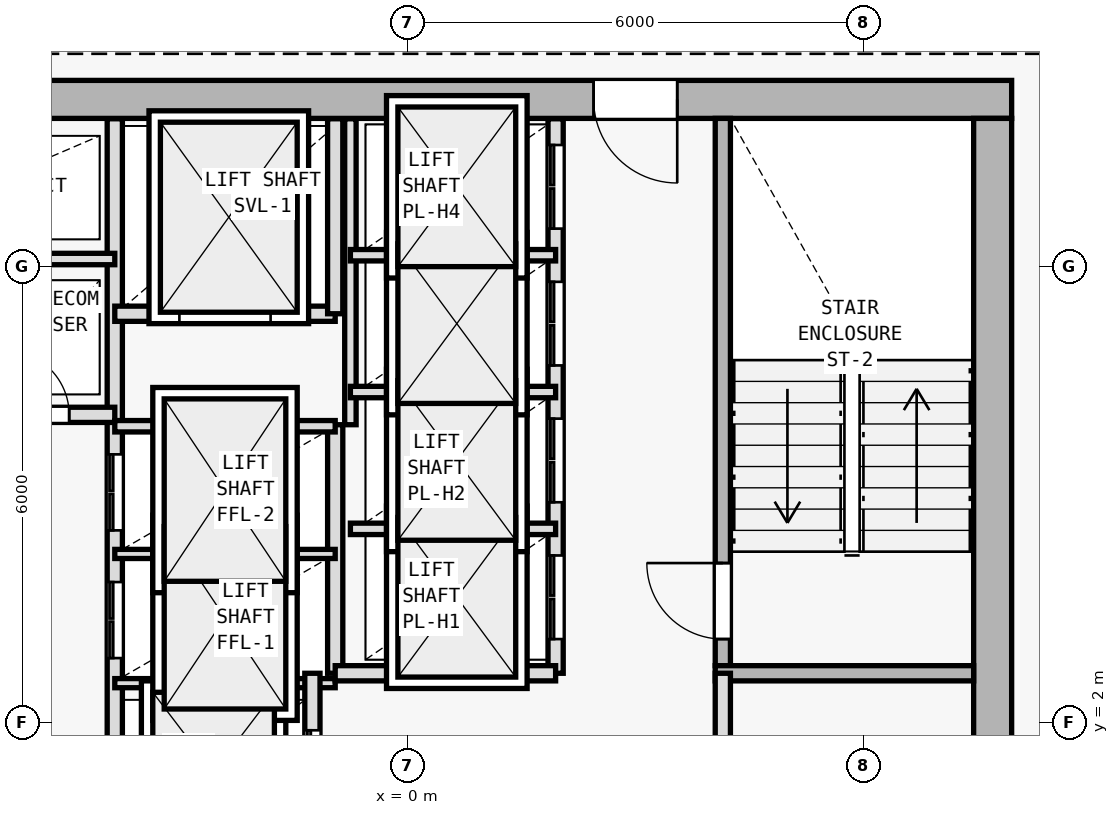
"""IFC4 building model, lengths in metres.
Left out: names, types, materials, properties, quantities, classifications, styles, units other than length and angle.
Written with IfcOpenShell. Run it as: python <this file> out.ifc"""

import sys

from ifc_helpers import new_model, si_unit, direction, frame, frame_2d, origin, origin_2d, place, context, subcontext, project, spatial, rectangle, i_section, extrude, element, fill, save


model = new_model("IFC4")
c1 = context("Model", 3, precision=1e-05, world=origin(), true_north=direction((0.0, 1.0)))
c2 = subcontext(c1, "Body", "Model", "MODEL_VIEW")
j1 = project(units=[si_unit("LENGTHUNIT", "METRE"), si_unit("PLANEANGLEUNIT", "RADIAN")], contexts=[c1])
p1 = place(None, origin())
s1 = spatial("IfcSite", under=j1, at=p1, CompositionType="ELEMENT")
p2 = place(p1, origin())
s2 = spatial("IfcBuilding", under=s1, at=p2, CompositionType="ELEMENT")
p3 = place(p2, frame((0.0, 0.0, 198.3)))
s3 = spatial("IfcBuildingStorey", under=s2, at=p3, CompositionType="ELEMENT", Elevation=198.3)
p4 = place(p3, frame((7.7, 10.2, 0.0), z_axis=(0.0, 0.0, 1.0), x_axis=(1.0, 0.0, 0.0)))
e1 = element("IfcColumn", 1, at=p4, inside=s3, PredefinedType="COLUMN", context=c2, shape_type="SweptSolid", body=[
    extrude(i_section(OverallWidth=0.398, OverallDepth=0.387, WebThickness=0.013, FlangeThickness=0.022, FilletRadius=0.015, at=origin_2d()), origin(), (0.0, 0.0, 1.0), 3.6),
])
p5 = place(p3, frame((7.95, 10.2, 0.0), z_axis=(0.0, 0.0, 1.0), x_axis=(-1.0, 0.0, 0.0)))
e2 = element("IfcWall", 2, at=p5, inside=s3, PredefinedType="SHEAR", context=c2, shape_type="SweptSolid", body=[
    extrude(rectangle(XDim=15.9, YDim=0.5, at=frame_2d((7.95, 0.0))), origin(), (0.0, 0.0, 1.0), 3.35),
])
p6 = place(p5, frame((4.4, 0.0, 0.0)))
e3 = element("IfcOpeningElement", 3, at=p6, cuts=e2, PredefinedType="OPENING", context=c2, shape_type="SweptSolid", body=[
    extrude(rectangle(XDim=1.1, YDim=2.15, at=frame_2d((0.55, 1.075))), frame((0.0, 0.26, 0.0), z_axis=(0.0, -1.0, 0.0), x_axis=(1.0, 0.0, 0.0)), (0.0, 0.0, 1.0), 0.52),
])
p7 = place(p3, frame((7.7, 9.95, 0.0), z_axis=(0.0, 0.0, 1.0), x_axis=(0.0, -1.0, 0.0)))
e4 = element("IfcWall", 4, at=p7, inside=s3, PredefinedType="SHEAR", context=c2, shape_type="SweptSolid", body=[
    extrude(rectangle(XDim=19.1, YDim=0.5, at=frame_2d((9.55, 0.0))), origin(), (0.0, 0.0, 1.0), 3.35),
])
p8 = place(p3, frame((-3.85, 1.35, 0.0), z_axis=(0.0, 0.0, 1.0), x_axis=(0.0, 1.0, 0.0)))
e5 = element("IfcWall", 5, at=p8, inside=s3, PredefinedType="SOLIDWALL", context=c2, shape_type="SweptSolid", body=[
    extrude(rectangle(XDim=8.595, YDim=0.2, at=frame_2d((4.297, 0.0))), origin(), (0.0, 0.0, 1.0), 3.35),
])
p9 = place(p8, frame((1.5, 0.0, 0.0)))
e6 = element("IfcOpeningElement", 6, at=p9, cuts=e5, PredefinedType="OPENING", context=c2, shape_type="SweptSolid", body=[
    extrude(rectangle(XDim=1.0, YDim=2.15, at=frame_2d((0.5, 1.075))), frame((0.0, 0.11, 0.0), z_axis=(0.0, -1.0, 0.0), x_axis=(1.0, 0.0, 0.0)), (0.0, 0.0, 1.0), 0.22),
])
p10 = place(p8, frame((3.18, 0.0, 0.0)))
e7 = element("IfcOpeningElement", 7, at=p10, cuts=e5, PredefinedType="OPENING", context=c2, shape_type="SweptSolid", body=[
    extrude(rectangle(XDim=1.0, YDim=2.15, at=frame_2d((0.5, 1.075))), frame((0.0, 0.11, 0.0), z_axis=(0.0, -1.0, 0.0), x_axis=(1.0, 0.0, 0.0)), (0.0, 0.0, 1.0), 0.22),
])
p11 = place(p3, frame((-7.445, 6.05, 0.0), z_axis=(0.0, 0.0, 1.0), x_axis=(1.0, 0.0, 0.0)))
e8 = element("IfcWall", 8, at=p11, inside=s3, PredefinedType="SOLIDWALL", context=c2, shape_type="SweptSolid", body=[
    extrude(rectangle(XDim=3.595, YDim=0.2, at=frame_2d((1.797, 0.0))), origin(), (0.0, 0.0, 1.0), 3.35),
])
p12 = place(p11, frame((0.345, 0.0, 0.0)))
e9 = element("IfcOpeningElement", 9, at=p12, cuts=e8, PredefinedType="OPENING", context=c2, shape_type="SweptSolid", body=[
    extrude(rectangle(XDim=0.85, YDim=2.1, at=frame_2d((0.425, 1.05))), frame((0.0, 0.11, 0.0), z_axis=(0.0, -1.0, 0.0), x_axis=(1.0, 0.0, 0.0)), (0.0, 0.0, 1.0), 0.22),
])
p13 = place(p11, frame((2.145, 0.0, 0.0)))
e10 = element("IfcOpeningElement", 10, at=p13, cuts=e8, PredefinedType="OPENING", context=c2, shape_type="SweptSolid", body=[
    extrude(rectangle(XDim=0.85, YDim=2.1, at=frame_2d((0.425, 1.05))), frame((0.0, 0.11, 0.0), z_axis=(0.0, -1.0, 0.0), x_axis=(1.0, 0.0, 0.0)), (0.0, 0.0, 1.0), 0.22),
])
p14 = place(p3, frame((-7.445, 8.1, 0.0), z_axis=(0.0, 0.0, 1.0), x_axis=(1.0, 0.0, 0.0)))
e11 = element("IfcWall", 11, at=p14, inside=s3, PredefinedType="PARTITIONING", context=c2, shape_type="SweptSolid", body=[
    extrude(rectangle(XDim=3.595, YDim=0.15, at=frame_2d((1.797, 0.0))), origin(), (0.0, 0.0, 1.0), 3.35),
])
p15 = place(p3, frame((4.15, 2.75, 0.0), z_axis=(0.0, 0.0, 1.0), x_axis=(0.0, 1.0, 0.0)))
e12 = element("IfcWall", 12, at=p15, inside=s3, PredefinedType="SOLIDWALL", context=c2, shape_type="SweptSolid", body=[
    extrude(rectangle(XDim=7.2, YDim=0.2, at=frame_2d((3.6, 0.0))), origin(), (0.0, 0.0, 1.0), 3.35),
])
p16 = place(p15, frame((0.35, 0.0, 0.0)))
e13 = element("IfcOpeningElement", 13, at=p16, cuts=e12, PredefinedType="OPENING", context=c2, shape_type="SweptSolid", body=[
    extrude(rectangle(XDim=1.0, YDim=2.15, at=frame_2d((0.5, 1.075))), frame((0.0, 0.11, 0.0), z_axis=(0.0, -1.0, 0.0), x_axis=(1.0, 0.0, 0.0)), (0.0, 0.0, 1.0), 0.22),
])
p17 = place(p3, frame((4.05, 2.65, 0.0), z_axis=(0.0, 0.0, 1.0), x_axis=(1.0, 0.0, 0.0)))
e14 = element("IfcWall", 14, at=p17, inside=s3, PredefinedType="SOLIDWALL", context=c2, shape_type="SweptSolid", body=[
    extrude(rectangle(XDim=3.4, YDim=0.2, at=frame_2d((1.7, 0.0))), origin(), (0.0, 0.0, 1.0), 3.35),
])
p18 = place(p3, frame((-0.95, 2.65, 0.0), z_axis=(0.0, 0.0, 1.0), x_axis=(0.0, 1.0, 0.0)))
e15 = element("IfcWall", 15, at=p18, inside=s3, PredefinedType="SOLIDWALL", context=c2, shape_type="SweptSolid", body=[
    extrude(rectangle(XDim=3.27, YDim=0.2, at=frame_2d((1.635, 0.0))), origin(), (0.0, 0.0, 1.0), 3.35),
])
for number, where, z_axis, x_axis in (
    (16, (-3.85, 2.52, 0.0), (0.0, 0.0, 1.0), (1.0, 0.0, 0.0)),
    (17, (-3.85, 4.22, 0.0), (0.0, 0.0, 1.0), (1.0, 0.0, 0.0)),
):
    element("IfcWall", number, at=place(p3, frame(where, z_axis=z_axis, x_axis=x_axis)), inside=s3, PredefinedType="PARTITIONING", context=c2, shape_type="SweptSolid", body=[
        extrude(rectangle(XDim=2.9, YDim=0.12, at=frame_2d((1.45, 0.0))), origin(), (0.0, 0.0, 1.0), 3.35),
    ])
p19 = place(p3, frame((-3.85, 5.9, 0.0), z_axis=(0.0, 0.0, 1.0), x_axis=(1.0, 0.0, 0.0)))
e18 = element("IfcWall", 18, at=p19, inside=s3, PredefinedType="PARTITIONING", context=c2, shape_type="SweptSolid", body=[
    extrude(rectangle(XDim=2.9, YDim=0.15, at=frame_2d((1.45, 0.0))), origin(), (0.0, 0.0, 1.0), 3.35),
])
p20 = place(p3, frame((-3.85, 7.38, 0.0), z_axis=(0.0, 0.0, 1.0), x_axis=(1.0, 0.0, 0.0)))
e19 = element("IfcWall", 19, at=p20, inside=s3, PredefinedType="SOLIDWALL", context=c2, shape_type="SweptSolid", body=[
    extrude(rectangle(XDim=2.9, YDim=0.2, at=frame_2d((1.45, 0.0))), origin(), (0.0, 0.0, 1.0), 3.35),
])
p21 = place(p20, frame((0.85, 0.0, 0.0)))
e20 = element("IfcOpeningElement", 20, at=p21, cuts=e19, PredefinedType="OPENING", context=c2, shape_type="SweptSolid", body=[
    extrude(rectangle(XDim=1.2, YDim=2.2, at=frame_2d((0.6, 1.1))), frame((0.0, 0.11, 0.0), z_axis=(0.0, -1.0, 0.0), x_axis=(1.0, 0.0, 0.0)), (0.0, 0.0, 1.0), 0.22),
])
p22 = place(p3, frame((-0.95, 7.38, 0.0), z_axis=(0.0, 0.0, 1.0), x_axis=(0.0, 1.0, 0.0)))
e21 = element("IfcWall", 21, at=p22, inside=s3, PredefinedType="SOLIDWALL", context=c2, shape_type="SweptSolid", body=[
    extrude(rectangle(XDim=2.565, YDim=0.2, at=frame_2d((1.283, 0.0))), origin(), (0.0, 0.0, 1.0), 3.35),
])
p23 = place(p3, frame((4.15, -6.05, 0.0), z_axis=(0.0, 0.0, 1.0), x_axis=(0.0, 1.0, 0.0)))
e22 = element("IfcWall", 22, at=p23, inside=s3, PredefinedType="SOLIDWALL", context=c2, shape_type="SweptSolid", body=[
    extrude(rectangle(XDim=8.7, YDim=0.2, at=frame_2d((4.35, 0.0))), origin(), (0.0, 0.0, 1.0), 3.35),
])
p24 = place(p23, frame((3.6, 0.0, 0.0)))
e23 = element("IfcOpeningElement", 23, at=p24, cuts=e22, PredefinedType="OPENING", context=c2, shape_type="SweptSolid", body=[
    extrude(rectangle(XDim=0.95, YDim=2.1, at=frame_2d((0.475, 1.05))), frame((0.0, 0.11, 0.0), z_axis=(0.0, -1.0, 0.0), x_axis=(1.0, 0.0, 0.0)), (0.0, 0.0, 1.0), 0.22),
])
p25 = place(p3, frame((-1.25, -6.05, 0.0), z_axis=(0.0, 0.0, 1.0), x_axis=(0.0, 1.0, 0.0)))
e24 = element("IfcWall", 24, at=p25, inside=s3, PredefinedType="SOLIDWALL", context=c2, shape_type="SweptSolid", body=[
    extrude(rectangle(XDim=8.7, YDim=0.2, at=frame_2d((4.35, 0.0))), origin(), (0.0, 0.0, 1.0), 3.35),
])
p26 = place(p25, frame((0.55, 0.0, 0.0)))
e25 = element("IfcOpeningElement", 25, at=p26, cuts=e24, PredefinedType="OPENING", context=c2, shape_type="SweptSolid", body=[
    extrude(rectangle(XDim=1.1, YDim=2.15, at=frame_2d((0.55, 1.075))), frame((0.0, 0.11, 0.0), z_axis=(0.0, -1.0, 0.0), x_axis=(1.0, 0.0, 0.0)), (0.0, 0.0, 1.0), 0.22),
])
p27 = place(p25, frame((2.65, 0.0, 0.0)))
e26 = element("IfcOpeningElement", 26, at=p27, cuts=e24, PredefinedType="OPENING", context=c2, shape_type="SweptSolid", body=[
    extrude(rectangle(XDim=1.1, YDim=2.15, at=frame_2d((0.55, 1.075))), frame((0.0, 0.11, 0.0), z_axis=(0.0, -1.0, 0.0), x_axis=(1.0, 0.0, 0.0)), (0.0, 0.0, 1.0), 0.22),
])
p28 = place(p25, frame((4.75, 0.0, 0.0)))
e27 = element("IfcOpeningElement", 27, at=p28, cuts=e24, PredefinedType="OPENING", context=c2, shape_type="SweptSolid", body=[
    extrude(rectangle(XDim=1.1, YDim=2.15, at=frame_2d((0.55, 1.075))), frame((0.0, 0.11, 0.0), z_axis=(0.0, -1.0, 0.0), x_axis=(1.0, 0.0, 0.0)), (0.0, 0.0, 1.0), 0.22),
])
p29 = place(p25, frame((6.85, 0.0, 0.0)))
e28 = element("IfcOpeningElement", 28, at=p29, cuts=e24, PredefinedType="OPENING", context=c2, shape_type="SweptSolid", body=[
    extrude(rectangle(XDim=1.1, YDim=2.15, at=frame_2d((0.55, 1.075))), frame((0.0, 0.11, 0.0), z_axis=(0.0, -1.0, 0.0), x_axis=(1.0, 0.0, 0.0)), (0.0, 0.0, 1.0), 0.22),
])
p30 = place(p3, frame((1.95, 2.65, 0.0), z_axis=(0.0, 0.0, 1.0), x_axis=(0.0, 1.0, 0.0)))
e29 = element("IfcWall", 29, at=p30, inside=s3, PredefinedType="SOLIDWALL", context=c2, shape_type="SweptSolid", body=[
    extrude(rectangle(XDim=7.295, YDim=0.2, at=frame_2d((3.647, 0.0))), origin(), (0.0, 0.0, 1.0), 3.35),
])
p31 = place(p30, frame((0.45, 0.0, 0.0)))
e30 = element("IfcOpeningElement", 30, at=p31, cuts=e29, PredefinedType="OPENING", context=c2, shape_type="SweptSolid", body=[
    extrude(rectangle(XDim=1.1, YDim=2.15, at=frame_2d((0.55, 1.075))), frame((0.0, 0.11, 0.0), z_axis=(0.0, -1.0, 0.0), x_axis=(1.0, 0.0, 0.0)), (0.0, 0.0, 1.0), 0.22),
])
p32 = place(p30, frame((2.25, 0.0, 0.0)))
e31 = element("IfcOpeningElement", 31, at=p32, cuts=e29, PredefinedType="OPENING", context=c2, shape_type="SweptSolid", body=[
    extrude(rectangle(XDim=1.1, YDim=2.15, at=frame_2d((0.55, 1.075))), frame((0.0, 0.11, 0.0), z_axis=(0.0, -1.0, 0.0), x_axis=(1.0, 0.0, 0.0)), (0.0, 0.0, 1.0), 0.22),
])
p33 = place(p30, frame((4.05, 0.0, 0.0)))
e32 = element("IfcOpeningElement", 32, at=p33, cuts=e29, PredefinedType="OPENING", context=c2, shape_type="SweptSolid", body=[
    extrude(rectangle(XDim=1.1, YDim=2.15, at=frame_2d((0.55, 1.075))), frame((0.0, 0.11, 0.0), z_axis=(0.0, -1.0, 0.0), x_axis=(1.0, 0.0, 0.0)), (0.0, 0.0, 1.0), 0.22),
])
p34 = place(p30, frame((5.85, 0.0, 0.0)))
e33 = element("IfcOpeningElement", 33, at=p34, cuts=e29, PredefinedType="OPENING", context=c2, shape_type="SweptSolid", body=[
    extrude(rectangle(XDim=1.1, YDim=2.15, at=frame_2d((0.55, 1.075))), frame((0.0, 0.11, 0.0), z_axis=(0.0, -1.0, 0.0), x_axis=(1.0, 0.0, 0.0)), (0.0, 0.0, 1.0), 0.22),
])
p35 = place(p3, frame((-0.95, 2.65, 0.0), z_axis=(0.0, 0.0, 1.0), x_axis=(1.0, 0.0, 0.0)))
e34 = element("IfcWall", 34, at=p35, inside=s3, PredefinedType="SOLIDWALL", context=c2, shape_type="SweptSolid", body=[
    extrude(rectangle(XDim=2.9, YDim=0.2, at=frame_2d((1.45, 0.0))), origin(), (0.0, 0.0, 1.0), 3.35),
])
p36 = place(p3, frame((-0.75, 5.92, 0.0), z_axis=(0.0, 0.0, 1.0), x_axis=(0.0, 1.0, 0.0)))
e35 = element("IfcWall", 35, at=p36, inside=s3, PredefinedType="PARTITIONING", context=c2, shape_type="SweptSolid", body=[
    extrude(rectangle(XDim=4.025, YDim=0.15, at=frame_2d((2.013, 0.0))), origin(), (0.0, 0.0, 1.0), 3.35),
])
for number, where, z_axis, x_axis in (
    (36, (-0.75, 4.55, 0.0), (0.0, 0.0, 1.0), (1.0, 0.0, 0.0)),
    (37, (-0.75, 6.35, 0.0), (0.0, 0.0, 1.0), (1.0, 0.0, 0.0)),
    (38, (-0.75, 8.15, 0.0), (0.0, 0.0, 1.0), (1.0, 0.0, 0.0)),
):
    element("IfcWall", number, at=place(p3, frame(where, z_axis=z_axis, x_axis=x_axis)), inside=s3, PredefinedType="PARTITIONING", context=c2, shape_type="SweptSolid", body=[
        extrude(rectangle(XDim=2.7, YDim=0.15, at=frame_2d((1.35, 0.0))), origin(), (0.0, 0.0, 1.0), 3.35),
    ])
p37 = place(p3, frame((7.023, 12.36, 0.0), z_axis=(0.0, 0.0, 1.0), x_axis=(0.84376480085, -0.536713108511, 0.0)))
e39 = element("IfcWall", 39, at=p37, inside=s3, PredefinedType="PARTITIONING", context=c2, shape_type="SweptSolid", body=[
    extrude(rectangle(XDim=7.297, YDim=0.15, at=frame_2d((3.648, 0.0))), origin(), (0.0, 0.0, 1.0), 2.935),
])
p38 = place(p6, origin())
e40 = element("IfcDoor", 40, at=p38, inside=s3, OperationType="SINGLE_SWING_LEFT", PredefinedType="DOOR", context=c2, shape_type="SweptSolid", body=[
    extrude(rectangle(XDim=1.1, YDim=2.15, at=frame_2d((0.55, 1.075))), frame((0.0, 0.025, 0.0), z_axis=(0.0, -1.0, 0.0), x_axis=(1.0, 0.0, 0.0)), (0.0, 0.0, 1.0), 0.05),
])
fill(e3, e40)
p39 = place(p13, origin())
e41 = element("IfcDoor", 41, at=p39, inside=s3, OperationType="SINGLE_SWING_LEFT", PredefinedType="DOOR", context=c2, shape_type="SweptSolid", body=[
    extrude(rectangle(XDim=0.85, YDim=2.1, at=frame_2d((0.425, 1.05))), frame((0.0, 0.025, 0.0), z_axis=(0.0, -1.0, 0.0), x_axis=(1.0, 0.0, 0.0)), (0.0, 0.0, 1.0), 0.05),
])
fill(e10, e41)
p40 = place(p16, origin())
e42 = element("IfcDoor", 42, at=p40, inside=s3, OperationType="SINGLE_SWING_RIGHT", PredefinedType="DOOR", context=c2, shape_type="SweptSolid", body=[
    extrude(rectangle(XDim=1.0, YDim=2.15, at=frame_2d((0.5, 1.075))), frame((0.0, 0.025, 0.0), z_axis=(0.0, -1.0, 0.0), x_axis=(1.0, 0.0, 0.0)), (0.0, 0.0, 1.0), 0.05),
])
fill(e13, e42)
p41 = place(p21, origin())
e43 = element("IfcDoor", 43, at=p41, inside=s3, OperationType="DOUBLE_DOOR_SLIDING", PredefinedType="DOOR", context=c2, shape_type="SweptSolid", body=[
    extrude(rectangle(XDim=1.2, YDim=2.2, at=frame_2d((0.6, 1.1))), frame((0.0, 0.025, 0.0), z_axis=(0.0, -1.0, 0.0), x_axis=(1.0, 0.0, 0.0)), (0.0, 0.0, 1.0), 0.05),
])
fill(e20, e43)
p42 = place(p29, origin())
e44 = element("IfcDoor", 44, at=p42, inside=s3, OperationType="DOUBLE_DOOR_SLIDING", PredefinedType="DOOR", context=c2, shape_type="SweptSolid", body=[
    extrude(rectangle(XDim=1.1, YDim=2.15, at=frame_2d((0.55, 1.075))), frame((0.0, 0.025, 0.0), z_axis=(0.0, -1.0, 0.0), x_axis=(1.0, 0.0, 0.0)), (0.0, 0.0, 1.0), 0.05),
])
fill(e28, e44)
p43 = place(p31, origin())
e45 = element("IfcDoor", 45, at=p43, inside=s3, OperationType="DOUBLE_DOOR_SLIDING", PredefinedType="DOOR", context=c2, shape_type="SweptSolid", body=[
    extrude(rectangle(XDim=1.1, YDim=2.15, at=frame_2d((0.55, 1.075))), frame((0.0, 0.025, 0.0), z_axis=(0.0, -1.0, 0.0), x_axis=(1.0, 0.0, 0.0)), (0.0, 0.0, 1.0), 0.05),
])
fill(e30, e45)
p44 = place(p32, origin())
e46 = element("IfcDoor", 46, at=p44, inside=s3, OperationType="DOUBLE_DOOR_SLIDING", PredefinedType="DOOR", context=c2, shape_type="SweptSolid", body=[
    extrude(rectangle(XDim=1.1, YDim=2.15, at=frame_2d((0.55, 1.075))), frame((0.0, 0.025, 0.0), z_axis=(0.0, -1.0, 0.0), x_axis=(1.0, 0.0, 0.0)), (0.0, 0.0, 1.0), 0.05),
])
fill(e31, e46)
p45 = place(p33, origin())
e47 = element("IfcDoor", 47, at=p45, inside=s3, OperationType="DOUBLE_DOOR_SLIDING", PredefinedType="DOOR", context=c2, shape_type="SweptSolid", body=[
    extrude(rectangle(XDim=1.1, YDim=2.15, at=frame_2d((0.55, 1.075))), frame((0.0, 0.025, 0.0), z_axis=(0.0, -1.0, 0.0), x_axis=(1.0, 0.0, 0.0)), (0.0, 0.0, 1.0), 0.05),
])
fill(e32, e47)
p46 = place(p34, origin())
e48 = element("IfcDoor", 48, at=p46, inside=s3, OperationType="DOUBLE_DOOR_SLIDING", PredefinedType="DOOR", context=c2, shape_type="SweptSolid", body=[
    extrude(rectangle(XDim=1.1, YDim=2.15, at=frame_2d((0.55, 1.075))), frame((0.0, 0.025, 0.0), z_axis=(0.0, -1.0, 0.0), x_axis=(1.0, 0.0, 0.0)), (0.0, 0.0, 1.0), 0.05),
])
fill(e33, e48)
p47 = place(p9, origin())
e49 = element("IfcDoor", 49, at=p47, inside=s3, OperationType="DOUBLE_DOOR_SLIDING", PredefinedType="DOOR", context=c2, shape_type="SweptSolid", body=[
    extrude(rectangle(XDim=1.0, YDim=2.15, at=frame_2d((0.5, 1.075))), frame((0.0, 0.025, 0.0), z_axis=(0.0, -1.0, 0.0), x_axis=(1.0, 0.0, 0.0)), (0.0, 0.0, 1.0), 0.05),
])
fill(e6, e49)
p48 = place(p10, origin())
e50 = element("IfcDoor", 50, at=p48, inside=s3, OperationType="DOUBLE_DOOR_SLIDING", PredefinedType="DOOR", context=c2, shape_type="SweptSolid", body=[
    extrude(rectangle(XDim=1.0, YDim=2.15, at=frame_2d((0.5, 1.075))), frame((0.0, 0.025, 0.0), z_axis=(0.0, -1.0, 0.0), x_axis=(1.0, 0.0, 0.0)), (0.0, 0.0, 1.0), 0.05),
])
fill(e7, e50)
save(model, sys.argv[1])
